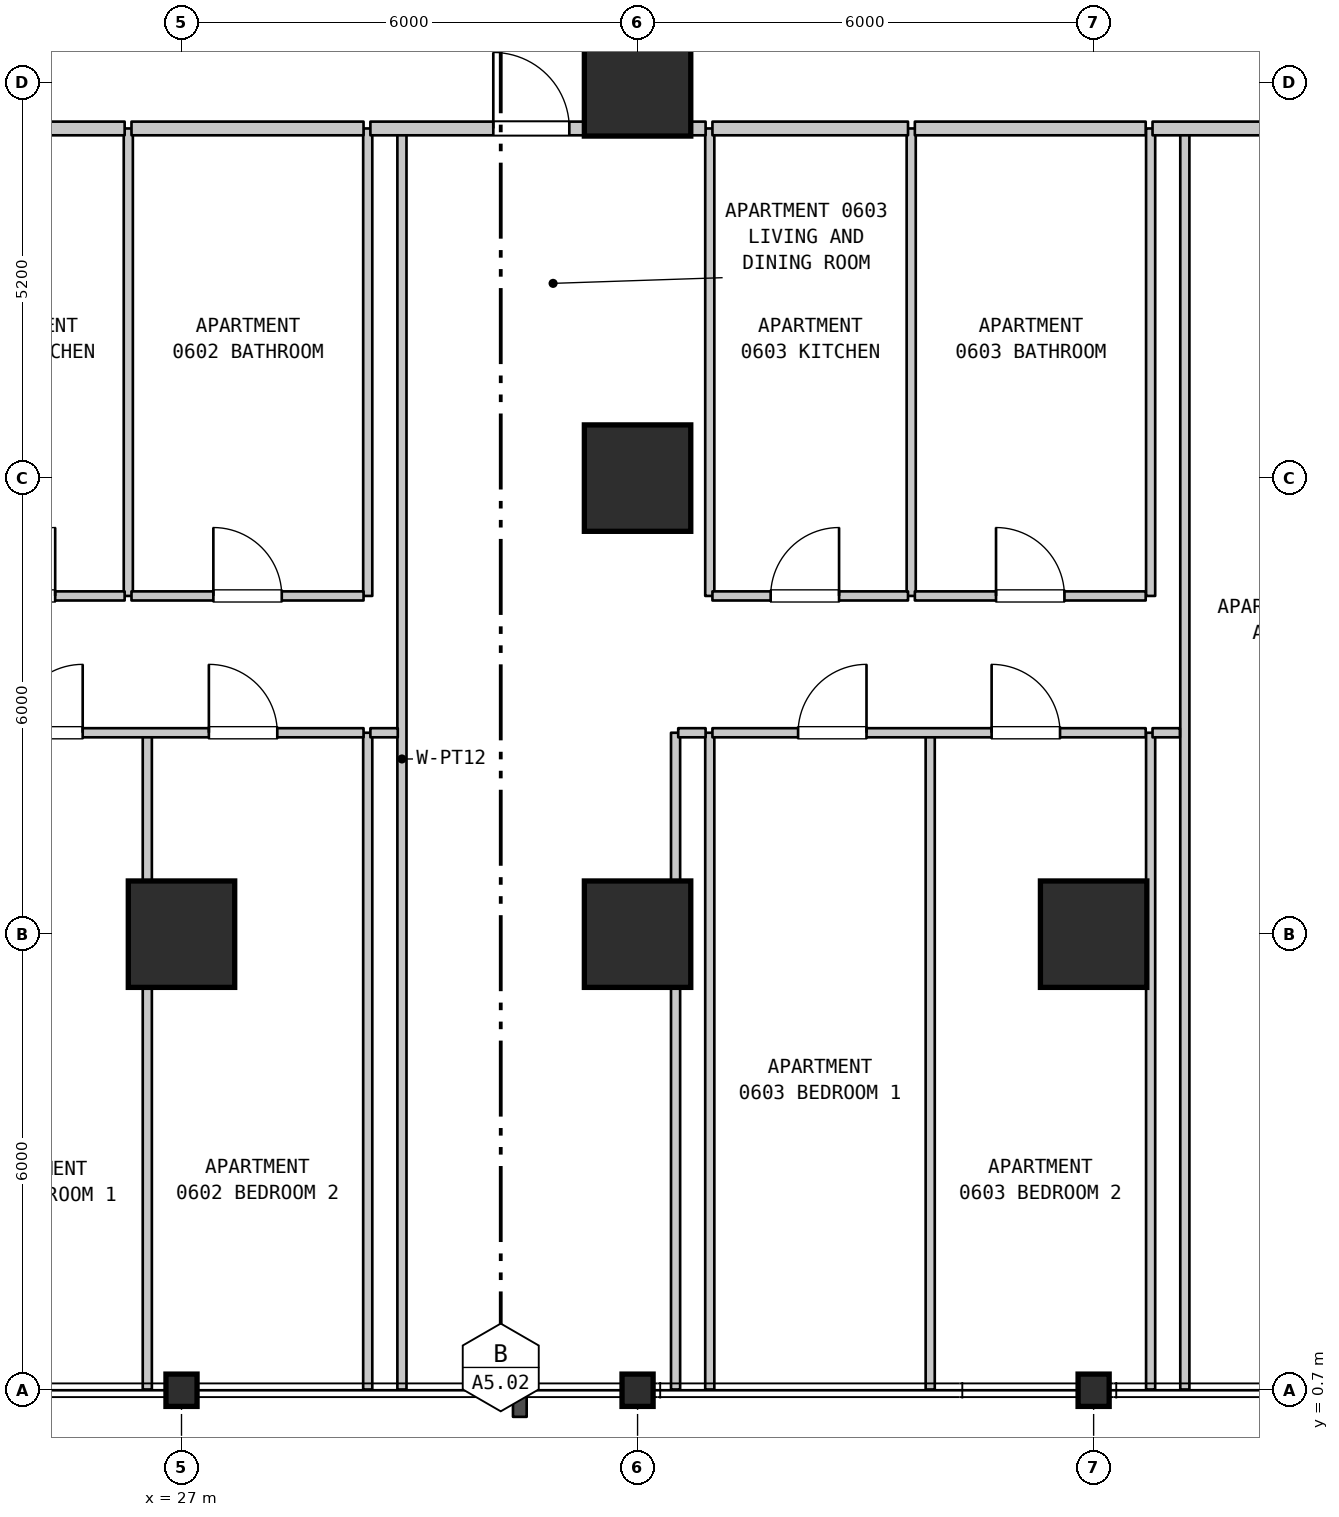
"""IFC4 building model, lengths in metres.
Left out: names, types, materials, properties, quantities, classifications, styles, units other than length and angle.
Written with IfcOpenShell. Run it as: python <this file> out.ifc"""

import sys

from ifc_helpers import new_model, si_unit, direction, frame, frame_2d, origin, origin_2d, place, context, subcontext, project, spatial, rectangle, i_section, extrude, element, fill, save


model = new_model("IFC4")
c1 = context("Model", 3, precision=1e-05, world=origin(), true_north=direction((0.0, 1.0)))
c2 = subcontext(c1, "Body", "Model", "MODEL_VIEW")
j1 = project(units=[si_unit("LENGTHUNIT", "METRE"), si_unit("PLANEANGLEUNIT", "RADIAN")], contexts=[c1])
p1 = place(None, origin())
s1 = spatial("IfcSite", under=j1, at=p1, CompositionType="ELEMENT")
p2 = place(p1, origin())
s2 = spatial("IfcBuilding", under=s1, at=p2, CompositionType="ELEMENT")
p3 = place(p2, frame((0.0, 0.0, 31.4)))
s3 = spatial("IfcBuildingStorey", under=s2, at=p3, CompositionType="ELEMENT", Elevation=31.4)
p4 = place(p3, frame((27.0, 0.7, 0.0), z_axis=(0.0, 0.0, 1.0), x_axis=(1.0, 0.0, 0.0)))
e1 = element("IfcColumn", 1, at=p4, inside=s3, PredefinedType="COLUMN", context=c2, shape_type="SweptSolid", body=[
    extrude(i_section(OverallWidth=0.409, OverallDepth=0.425, WebThickness=0.032, FlangeThickness=0.052, FilletRadius=0.015, at=origin_2d()), origin(), (0.0, 0.0, 1.0), 3.7),
])
p5 = place(p3, frame((27.0, 6.7, 0.0), z_axis=(0.0, 0.0, 1.0), x_axis=(1.0, 0.0, 0.0)))
e2 = element("IfcColumn", 2, at=p5, inside=s3, PredefinedType="COLUMN", context=c2, shape_type="SweptSolid", body=[
    extrude(rectangle(XDim=1.4, YDim=1.4, at=origin_2d()), origin(), (0.0, 0.0, 1.0), 3.7),
])
p6 = place(p3, frame((33.0, 0.7, 0.0), z_axis=(0.0, 0.0, 1.0), x_axis=(1.0, 0.0, 0.0)))
e3 = element("IfcColumn", 3, at=p6, inside=s3, PredefinedType="COLUMN", context=c2, shape_type="SweptSolid", body=[
    extrude(i_section(OverallWidth=0.409, OverallDepth=0.425, WebThickness=0.032, FlangeThickness=0.052, FilletRadius=0.015, at=origin_2d()), origin(), (0.0, 0.0, 1.0), 3.7),
])
for number, where, z_axis, x_axis in (
    (4, (33.0, 6.7, 0.0), (0.0, 0.0, 1.0), (1.0, 0.0, 0.0)),
    (5, (33.0, 12.7, 0.0), (0.0, 0.0, 1.0), (1.0, 0.0, 0.0)),
    (6, (33.0, 17.9, 0.0), (0.0, 0.0, 1.0), (1.0, 0.0, 0.0)),
):
    element("IfcColumn", number, at=place(p3, frame(where, z_axis=z_axis, x_axis=x_axis)), inside=s3, PredefinedType="COLUMN", context=c2, shape_type="SweptSolid", body=[
        extrude(rectangle(XDim=1.4, YDim=1.4, at=origin_2d()), origin(), (0.0, 0.0, 1.0), 3.7),
    ])
p7 = place(p3, frame((39.0, 0.7, 0.0), z_axis=(0.0, 0.0, 1.0), x_axis=(1.0, 0.0, 0.0)))
e7 = element("IfcColumn", 7, at=p7, inside=s3, PredefinedType="COLUMN", context=c2, shape_type="SweptSolid", body=[
    extrude(i_section(OverallWidth=0.409, OverallDepth=0.425, WebThickness=0.032, FlangeThickness=0.052, FilletRadius=0.015, at=origin_2d()), origin(), (0.0, 0.0, 1.0), 3.7),
])
p8 = place(p3, frame((39.0, 6.7, 0.0), z_axis=(0.0, 0.0, 1.0), x_axis=(1.0, 0.0, 0.0)))
e8 = element("IfcColumn", 8, at=p8, inside=s3, PredefinedType="COLUMN", context=c2, shape_type="SweptSolid", body=[
    extrude(rectangle(XDim=1.4, YDim=1.4, at=origin_2d()), origin(), (0.0, 0.0, 1.0), 3.7),
])
p9 = place(p3, frame((26.3, 11.15, 0.0), z_axis=(0.0, 0.0, 1.0), x_axis=(0.0, 1.0, 0.0)))
e9 = element("IfcWall", 9, at=p9, inside=s3, PredefinedType="PARTITIONING", context=c2, shape_type="SweptSolid", body=[
    extrude(rectangle(XDim=6.15, YDim=0.12, at=frame_2d((3.075, 0.0))), origin(), (0.0, 0.0, 1.0), 3.385),
])
for number, where, z_axis, x_axis in (
    (10, (26.55, 0.71, 0.0), (0.0, 0.0, 1.0), (0.0, 1.0, 0.0)),
    (11, (29.45, 0.71, 0.0), (0.0, 0.0, 1.0), (0.0, 1.0, 0.0)),
):
    element("IfcWall", number, at=place(p3, frame(where, z_axis=z_axis, x_axis=x_axis)), inside=s3, PredefinedType="PARTITIONING", context=c2, shape_type="SweptSolid", body=[
        extrude(rectangle(XDim=8.64, YDim=0.12, at=frame_2d((4.32, 0.0))), origin(), (0.0, 0.0, 1.0), 3.385),
    ])
p10 = place(p3, frame((29.45, 11.15, 0.0), z_axis=(0.0, 0.0, 1.0), x_axis=(0.0, 1.0, 0.0)))
e12 = element("IfcWall", 12, at=p10, inside=s3, PredefinedType="PARTITIONING", context=c2, shape_type="SweptSolid", body=[
    extrude(rectangle(XDim=6.15, YDim=0.12, at=frame_2d((3.075, 0.0))), origin(), (0.0, 0.0, 1.0), 3.385),
])
p11 = place(p3, frame((29.9, 0.71, 0.0), z_axis=(0.0, 0.0, 1.0), x_axis=(0.0, 1.0, 0.0)))
e13 = element("IfcWall", 13, at=p11, inside=s3, PredefinedType="PARTITIONING", context=c2, shape_type="SweptSolid", body=[
    extrude(rectangle(XDim=16.59, YDim=0.12, at=frame_2d((8.295, 0.0))), origin(), (0.0, 0.0, 1.0), 3.385),
])
for number, where, z_axis, x_axis in (
    (14, (33.5, 0.71, 0.0), (0.0, 0.0, 1.0), (0.0, 1.0, 0.0)),
    (15, (33.95, 0.71, 0.0), (0.0, 0.0, 1.0), (0.0, 1.0, 0.0)),
):
    element("IfcWall", number, at=place(p3, frame(where, z_axis=z_axis, x_axis=x_axis)), inside=s3, PredefinedType="PARTITIONING", context=c2, shape_type="SweptSolid", body=[
        extrude(rectangle(XDim=8.64, YDim=0.12, at=frame_2d((4.32, 0.0))), origin(), (0.0, 0.0, 1.0), 3.385),
    ])
for number, where, z_axis, x_axis in (
    (16, (33.95, 11.15, 0.0), (0.0, 0.0, 1.0), (0.0, 1.0, 0.0)),
    (17, (36.6, 11.15, 0.0), (0.0, 0.0, 1.0), (0.0, 1.0, 0.0)),
):
    element("IfcWall", number, at=place(p3, frame(where, z_axis=z_axis, x_axis=x_axis)), inside=s3, PredefinedType="PARTITIONING", context=c2, shape_type="SweptSolid", body=[
        extrude(rectangle(XDim=6.15, YDim=0.12, at=frame_2d((3.075, 0.0))), origin(), (0.0, 0.0, 1.0), 3.385),
    ])
for number, where, z_axis, x_axis in (
    (18, (36.85, 0.71, 0.0), (0.0, 0.0, 1.0), (0.0, 1.0, 0.0)),
    (19, (39.75, 0.71, 0.0), (0.0, 0.0, 1.0), (0.0, 1.0, 0.0)),
):
    element("IfcWall", number, at=place(p3, frame(where, z_axis=z_axis, x_axis=x_axis)), inside=s3, PredefinedType="PARTITIONING", context=c2, shape_type="SweptSolid", body=[
        extrude(rectangle(XDim=8.64, YDim=0.12, at=frame_2d((4.32, 0.0))), origin(), (0.0, 0.0, 1.0), 3.385),
    ])
p12 = place(p3, frame((39.75, 11.15, 0.0), z_axis=(0.0, 0.0, 1.0), x_axis=(0.0, 1.0, 0.0)))
e20 = element("IfcWall", 20, at=p12, inside=s3, PredefinedType="PARTITIONING", context=c2, shape_type="SweptSolid", body=[
    extrude(rectangle(XDim=6.15, YDim=0.12, at=frame_2d((3.075, 0.0))), origin(), (0.0, 0.0, 1.0), 3.385),
])
p13 = place(p3, frame((40.2, 0.71, 0.0), z_axis=(0.0, 0.0, 1.0), x_axis=(0.0, 1.0, 0.0)))
e21 = element("IfcWall", 21, at=p13, inside=s3, PredefinedType="PARTITIONING", context=c2, shape_type="SweptSolid", body=[
    extrude(rectangle(XDim=16.59, YDim=0.12, at=frame_2d((8.295, 0.0))), origin(), (0.0, 0.0, 1.0), 3.385),
])
p14 = place(p3, frame((23.665, 9.35, 0.0), z_axis=(0.0, 0.0, 1.0), x_axis=(1.0, 0.0, 0.0)))
e22 = element("IfcWall", 22, at=p14, inside=s3, PredefinedType="PARTITIONING", context=c2, shape_type="SweptSolid", body=[
    extrude(rectangle(XDim=5.73, YDim=0.12, at=frame_2d((2.865, 0.0))), origin(), (0.0, 0.0, 1.0), 3.385),
])
p15 = place(p14, frame((1.135, 0.0, 0.0)))
e23 = element("IfcOpeningElement", 23, at=p15, cuts=e22, PredefinedType="OPENING", context=c2, shape_type="SweptSolid", body=[
    extrude(rectangle(XDim=0.9, YDim=2.15, at=frame_2d((0.45, 1.075))), frame((0.0, 0.07, 0.0), z_axis=(0.0, -1.0, 0.0), x_axis=(1.0, 0.0, 0.0)), (0.0, 0.0, 1.0), 0.14),
])
p16 = place(p14, frame((3.695, 0.0, 0.0)))
e24 = element("IfcOpeningElement", 24, at=p16, cuts=e22, PredefinedType="OPENING", context=c2, shape_type="SweptSolid", body=[
    extrude(rectangle(XDim=0.9, YDim=2.15, at=frame_2d((0.45, 1.075))), frame((0.0, 0.07, 0.0), z_axis=(0.0, -1.0, 0.0), x_axis=(1.0, 0.0, 0.0)), (0.0, 0.0, 1.0), 0.14),
])
p17 = place(p3, frame((29.485, 9.35, 0.0), z_axis=(0.0, 0.0, 1.0), x_axis=(1.0, 0.0, 0.0)))
e25 = element("IfcWall", 25, at=p17, inside=s3, PredefinedType="PARTITIONING", context=c2, shape_type="SweptSolid", body=[
    extrude(rectangle(XDim=0.36, YDim=0.12, at=frame_2d((0.18, 0.0))), origin(), (0.0, 0.0, 1.0), 3.385),
])
p18 = place(p3, frame((33.535, 9.35, 0.0), z_axis=(0.0, 0.0, 1.0), x_axis=(1.0, 0.0, 0.0)))
e26 = element("IfcWall", 26, at=p18, inside=s3, PredefinedType="PARTITIONING", context=c2, shape_type="SweptSolid", body=[
    extrude(rectangle(XDim=0.36, YDim=0.12, at=frame_2d((0.18, 0.0))), origin(), (0.0, 0.0, 1.0), 3.385),
])
p19 = place(p3, frame((33.985, 9.35, 0.0), z_axis=(0.0, 0.0, 1.0), x_axis=(1.0, 0.0, 0.0)))
e27 = element("IfcWall", 27, at=p19, inside=s3, PredefinedType="PARTITIONING", context=c2, shape_type="SweptSolid", body=[
    extrude(rectangle(XDim=5.7, YDim=0.12, at=frame_2d((2.85, 0.0))), origin(), (0.0, 0.0, 1.0), 3.385),
])
p20 = place(p19, frame((1.127, 0.0, 0.0)))
e28 = element("IfcOpeningElement", 28, at=p20, cuts=e27, PredefinedType="OPENING", context=c2, shape_type="SweptSolid", body=[
    extrude(rectangle(XDim=0.9, YDim=2.15, at=frame_2d((0.45, 1.075))), frame((0.0, 0.07, 0.0), z_axis=(0.0, -1.0, 0.0), x_axis=(1.0, 0.0, 0.0)), (0.0, 0.0, 1.0), 0.14),
])
p21 = place(p19, frame((3.673, 0.0, 0.0)))
e29 = element("IfcOpeningElement", 29, at=p21, cuts=e27, PredefinedType="OPENING", context=c2, shape_type="SweptSolid", body=[
    extrude(rectangle(XDim=0.9, YDim=2.15, at=frame_2d((0.45, 1.075))), frame((0.0, 0.07, 0.0), z_axis=(0.0, -1.0, 0.0), x_axis=(1.0, 0.0, 0.0)), (0.0, 0.0, 1.0), 0.14),
])
p22 = place(p3, frame((39.775, 9.35, 0.0), z_axis=(0.0, 0.0, 1.0), x_axis=(1.0, 0.0, 0.0)))
e30 = element("IfcWall", 30, at=p22, inside=s3, PredefinedType="PARTITIONING", context=c2, shape_type="SweptSolid", body=[
    extrude(rectangle(XDim=0.36, YDim=0.12, at=frame_2d((0.18, 0.0))), origin(), (0.0, 0.0, 1.0), 3.385),
])
p23 = place(p3, frame((23.665, 11.15, 0.0), z_axis=(0.0, 0.0, 1.0), x_axis=(1.0, 0.0, 0.0)))
e31 = element("IfcWall", 31, at=p23, inside=s3, PredefinedType="PARTITIONING", context=c2, shape_type="SweptSolid", body=[
    extrude(rectangle(XDim=2.587, YDim=0.12, at=frame_2d((1.293, 0.0))), origin(), (0.0, 0.0, 1.0), 3.385),
])
p24 = place(p23, frame((0.773, 0.0, 0.0)))
e32 = element("IfcOpeningElement", 32, at=p24, cuts=e31, PredefinedType="OPENING", context=c2, shape_type="SweptSolid", body=[
    extrude(rectangle(XDim=0.9, YDim=2.15, at=frame_2d((0.45, 1.075))), frame((0.0, 0.07, 0.0), z_axis=(0.0, -1.0, 0.0), x_axis=(1.0, 0.0, 0.0)), (0.0, 0.0, 1.0), 0.14),
])
p25 = place(p3, frame((26.342, 11.15, 0.0), z_axis=(0.0, 0.0, 1.0), x_axis=(1.0, 0.0, 0.0)))
e33 = element("IfcWall", 33, at=p25, inside=s3, PredefinedType="PARTITIONING", context=c2, shape_type="SweptSolid", body=[
    extrude(rectangle(XDim=3.053, YDim=0.12, at=frame_2d((1.526, 0.0))), origin(), (0.0, 0.0, 1.0), 3.385),
])
p26 = place(p25, frame((1.077, 0.0, 0.0)))
e34 = element("IfcOpeningElement", 34, at=p26, cuts=e33, PredefinedType="OPENING", context=c2, shape_type="SweptSolid", body=[
    extrude(rectangle(XDim=0.9, YDim=2.1, at=frame_2d((0.45, 1.05))), frame((0.0, 0.07, 0.0), z_axis=(0.0, -1.0, 0.0), x_axis=(1.0, 0.0, 0.0)), (0.0, 0.0, 1.0), 0.14),
])
p27 = place(p3, frame((33.985, 11.15, 0.0), z_axis=(0.0, 0.0, 1.0), x_axis=(1.0, 0.0, 0.0)))
e35 = element("IfcWall", 35, at=p27, inside=s3, PredefinedType="PARTITIONING", context=c2, shape_type="SweptSolid", body=[
    extrude(rectangle(XDim=2.573, YDim=0.12, at=frame_2d((1.287, 0.0))), origin(), (0.0, 0.0, 1.0), 3.385),
])
p28 = place(p27, frame((0.766, 0.0, 0.0)))
e36 = element("IfcOpeningElement", 36, at=p28, cuts=e35, PredefinedType="OPENING", context=c2, shape_type="SweptSolid", body=[
    extrude(rectangle(XDim=0.9, YDim=2.15, at=frame_2d((0.45, 1.075))), frame((0.0, 0.07, 0.0), z_axis=(0.0, -1.0, 0.0), x_axis=(1.0, 0.0, 0.0)), (0.0, 0.0, 1.0), 0.14),
])
p29 = place(p3, frame((36.648, 11.15, 0.0), z_axis=(0.0, 0.0, 1.0), x_axis=(1.0, 0.0, 0.0)))
e37 = element("IfcWall", 37, at=p29, inside=s3, PredefinedType="PARTITIONING", context=c2, shape_type="SweptSolid", body=[
    extrude(rectangle(XDim=3.037, YDim=0.12, at=frame_2d((1.519, 0.0))), origin(), (0.0, 0.0, 1.0), 3.385),
])
p30 = place(p29, frame((1.068, 0.0, 0.0)))
e38 = element("IfcOpeningElement", 38, at=p30, cuts=e37, PredefinedType="OPENING", context=c2, shape_type="SweptSolid", body=[
    extrude(rectangle(XDim=0.9, YDim=2.1, at=frame_2d((0.45, 1.05))), frame((0.0, 0.07, 0.0), z_axis=(0.0, -1.0, 0.0), x_axis=(1.0, 0.0, 0.0)), (0.0, 0.0, 1.0), 0.14),
])
p31 = place(p3, frame((23.665, 17.3, 0.0), z_axis=(0.0, 0.0, 1.0), x_axis=(1.0, 0.0, 0.0)))
e39 = element("IfcWall", 39, at=p31, inside=s3, PredefinedType="STANDARD", context=c2, shape_type="SweptSolid", body=[
    extrude(rectangle(XDim=2.587, YDim=0.18, at=frame_2d((1.293, 0.0))), origin(), (0.0, 0.0, 1.0), 3.385),
])
p32 = place(p3, frame((26.342, 17.3, 0.0), z_axis=(0.0, 0.0, 1.0), x_axis=(1.0, 0.0, 0.0)))
e40 = element("IfcWall", 40, at=p32, inside=s3, PredefinedType="STANDARD", context=c2, shape_type="SweptSolid", body=[
    extrude(rectangle(XDim=3.053, YDim=0.18, at=frame_2d((1.526, 0.0))), origin(), (0.0, 0.0, 1.0), 3.385),
])
p33 = place(p3, frame((29.485, 17.3, 0.0), z_axis=(0.0, 0.0, 1.0), x_axis=(1.0, 0.0, 0.0)))
e41 = element("IfcWall", 41, at=p33, inside=s3, PredefinedType="STANDARD", context=c2, shape_type="SweptSolid", body=[
    extrude(rectangle(XDim=4.41, YDim=0.18, at=frame_2d((2.205, 0.0))), origin(), (0.0, 0.0, 1.0), 3.385),
])
p34 = place(p33, frame((1.617, 0.0, 0.0)))
e42 = element("IfcOpeningElement", 42, at=p34, cuts=e41, PredefinedType="OPENING", context=c2, shape_type="SweptSolid", body=[
    extrude(rectangle(XDim=1.0, YDim=2.15, at=frame_2d((0.5, 1.075))), frame((0.0, 0.1, 0.0), z_axis=(0.0, -1.0, 0.0), x_axis=(1.0, 0.0, 0.0)), (0.0, 0.0, 1.0), 0.2),
])
p35 = place(p3, frame((33.985, 17.3, 0.0), z_axis=(0.0, 0.0, 1.0), x_axis=(1.0, 0.0, 0.0)))
e43 = element("IfcWall", 43, at=p35, inside=s3, PredefinedType="STANDARD", context=c2, shape_type="SweptSolid", body=[
    extrude(rectangle(XDim=2.573, YDim=0.18, at=frame_2d((1.287, 0.0))), origin(), (0.0, 0.0, 1.0), 3.385),
])
p36 = place(p3, frame((36.648, 17.3, 0.0), z_axis=(0.0, 0.0, 1.0), x_axis=(1.0, 0.0, 0.0)))
e44 = element("IfcWall", 44, at=p36, inside=s3, PredefinedType="STANDARD", context=c2, shape_type="SweptSolid", body=[
    extrude(rectangle(XDim=3.037, YDim=0.18, at=frame_2d((1.519, 0.0))), origin(), (0.0, 0.0, 1.0), 3.385),
])
p37 = place(p3, frame((39.775, 17.3, 0.0), z_axis=(0.0, 0.0, 1.0), x_axis=(1.0, 0.0, 0.0)))
e45 = element("IfcWall", 45, at=p37, inside=s3, PredefinedType="STANDARD", context=c2, shape_type="SweptSolid", body=[
    extrude(rectangle(XDim=4.41, YDim=0.18, at=frame_2d((2.205, 0.0))), origin(), (0.0, 0.0, 1.0), 3.385),
])
p38 = place(p37, frame((1.905, 0.0, 0.0)))
e46 = element("IfcOpeningElement", 46, at=p38, cuts=e45, PredefinedType="OPENING", context=c2, shape_type="SweptSolid", body=[
    extrude(rectangle(XDim=1.0, YDim=2.15, at=frame_2d((0.5, 1.075))), frame((0.0, 0.1, 0.0), z_axis=(0.0, -1.0, 0.0), x_axis=(1.0, 0.0, 0.0)), (0.0, 0.0, 1.0), 0.2),
])
p39 = place(p15, origin())
e47 = element("IfcDoor", 47, at=p39, inside=s3, OperationType="SINGLE_SWING_RIGHT", PredefinedType="DOOR", context=c2, shape_type="SweptSolid", body=[
    extrude(rectangle(XDim=0.9, YDim=2.15, at=frame_2d((0.45, 1.075))), frame((0.0, 0.025, 0.0), z_axis=(0.0, -1.0, 0.0), x_axis=(1.0, 0.0, 0.0)), (0.0, 0.0, 1.0), 0.05),
])
fill(e23, e47)
p40 = place(p16, origin())
e48 = element("IfcDoor", 48, at=p40, inside=s3, OperationType="SINGLE_SWING_LEFT", PredefinedType="DOOR", context=c2, shape_type="SweptSolid", body=[
    extrude(rectangle(XDim=0.9, YDim=2.15, at=frame_2d((0.45, 1.075))), frame((0.0, 0.025, 0.0), z_axis=(0.0, -1.0, 0.0), x_axis=(1.0, 0.0, 0.0)), (0.0, 0.0, 1.0), 0.05),
])
fill(e24, e48)
p41 = place(p20, origin())
e49 = element("IfcDoor", 49, at=p41, inside=s3, OperationType="SINGLE_SWING_RIGHT", PredefinedType="DOOR", context=c2, shape_type="SweptSolid", body=[
    extrude(rectangle(XDim=0.9, YDim=2.15, at=frame_2d((0.45, 1.075))), frame((0.0, 0.025, 0.0), z_axis=(0.0, -1.0, 0.0), x_axis=(1.0, 0.0, 0.0)), (0.0, 0.0, 1.0), 0.05),
])
fill(e28, e49)
p42 = place(p21, origin())
e50 = element("IfcDoor", 50, at=p42, inside=s3, OperationType="SINGLE_SWING_LEFT", PredefinedType="DOOR", context=c2, shape_type="SweptSolid", body=[
    extrude(rectangle(XDim=0.9, YDim=2.15, at=frame_2d((0.45, 1.075))), frame((0.0, 0.025, 0.0), z_axis=(0.0, -1.0, 0.0), x_axis=(1.0, 0.0, 0.0)), (0.0, 0.0, 1.0), 0.05),
])
fill(e29, e50)
p43 = place(p24, origin())
e51 = element("IfcDoor", 51, at=p43, inside=s3, OperationType="SINGLE_SWING_RIGHT", PredefinedType="DOOR", context=c2, shape_type="SweptSolid", body=[
    extrude(rectangle(XDim=0.9, YDim=2.15, at=frame_2d((0.45, 1.075))), frame((0.0, 0.025, 0.0), z_axis=(0.0, -1.0, 0.0), x_axis=(1.0, 0.0, 0.0)), (0.0, 0.0, 1.0), 0.05),
])
fill(e32, e51)
p44 = place(p26, origin())
e52 = element("IfcDoor", 52, at=p44, inside=s3, OperationType="SINGLE_SWING_LEFT", PredefinedType="DOOR", context=c2, shape_type="SweptSolid", body=[
    extrude(rectangle(XDim=0.9, YDim=2.1, at=frame_2d((0.45, 1.05))), frame((0.0, 0.025, 0.0), z_axis=(0.0, -1.0, 0.0), x_axis=(1.0, 0.0, 0.0)), (0.0, 0.0, 1.0), 0.05),
])
fill(e34, e52)
p45 = place(p28, origin())
e53 = element("IfcDoor", 53, at=p45, inside=s3, OperationType="SINGLE_SWING_RIGHT", PredefinedType="DOOR", context=c2, shape_type="SweptSolid", body=[
    extrude(rectangle(XDim=0.9, YDim=2.15, at=frame_2d((0.45, 1.075))), frame((0.0, 0.025, 0.0), z_axis=(0.0, -1.0, 0.0), x_axis=(1.0, 0.0, 0.0)), (0.0, 0.0, 1.0), 0.05),
])
fill(e36, e53)
p46 = place(p30, origin())
e54 = element("IfcDoor", 54, at=p46, inside=s3, OperationType="SINGLE_SWING_LEFT", PredefinedType="DOOR", context=c2, shape_type="SweptSolid", body=[
    extrude(rectangle(XDim=0.9, YDim=2.1, at=frame_2d((0.45, 1.05))), frame((0.0, 0.025, 0.0), z_axis=(0.0, -1.0, 0.0), x_axis=(1.0, 0.0, 0.0)), (0.0, 0.0, 1.0), 0.05),
])
fill(e38, e54)
p47 = place(p34, origin())
e55 = element("IfcDoor", 55, at=p47, inside=s3, OperationType="SINGLE_SWING_LEFT", PredefinedType="DOOR", context=c2, shape_type="SweptSolid", body=[
    extrude(rectangle(XDim=1.0, YDim=2.15, at=frame_2d((0.5, 1.075))), frame((0.0, 0.025, 0.0), z_axis=(0.0, -1.0, 0.0), x_axis=(1.0, 0.0, 0.0)), (0.0, 0.0, 1.0), 0.05),
])
fill(e42, e55)
save(model, sys.argv[1])
